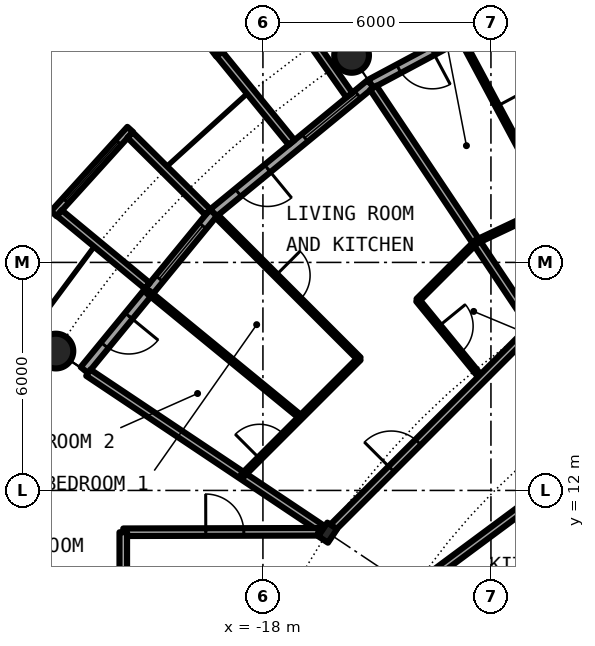
"""IFC4 building model, lengths in metres.
Left out: names, types, materials, properties, quantities, classifications, styles, units other than length and angle.
Written with IfcOpenShell. Run it as: python <this file> out.ifc"""

import sys

from ifc_helpers import new_model, si_unit, direction, frame, frame_2d, origin, origin_2d, place, context, subcontext, project, spatial, rectangle, circle, hollow_circle, i_section, extrude, element, fill, save


model = new_model("IFC4")
c1 = context("Model", 3, precision=1e-05, world=origin(), true_north=direction((0.0, 1.0)))
c2 = subcontext(c1, "Body", "Model", "MODEL_VIEW")
j1 = project(units=[si_unit("LENGTHUNIT", "METRE"), si_unit("PLANEANGLEUNIT", "RADIAN")], contexts=[c1])
p1 = place(None, origin())
s1 = spatial("IfcSite", under=j1, at=p1, CompositionType="ELEMENT")
p2 = place(p1, origin())
s2 = spatial("IfcBuilding", under=s1, at=p2, CompositionType="ELEMENT")
p3 = place(p2, frame((0.0, 0.0, 117.75)))
s3 = spatial("IfcBuildingStorey", under=s2, at=p3, CompositionType="ELEMENT", Elevation=117.75)
for number, where, z_axis, x_axis in (
    (1, (-15.667, 23.448, 0.0), (0.0, 0.0, 1.0), (1.0, 0.0, 0.0)),
    (2, (-23.448, 15.667, 0.0), (0.0, 0.0, 1.0), (1.0, 0.0, 0.0)),
):
    element("IfcColumn", number, at=place(p3, frame(where, z_axis=z_axis, x_axis=x_axis)), inside=s3, PredefinedType="COLUMN", context=c2, shape_type="SweptSolid", body=[
        extrude(hollow_circle(Radius=0.457, WallThickness=0.04, at=origin_2d()), origin(), (0.0, 0.0, 1.0), 3.05),
    ])
p4 = place(p3, frame((-16.297, 10.889, 0.0), z_axis=(0.0, 0.0, 1.0), x_axis=(-0.831469612303, 0.55557023302, 0.0)))
e3 = element("IfcColumn", 3, at=p4, inside=s3, PredefinedType="COLUMN", context=c2, shape_type="SweptSolid", body=[
    extrude(i_section(OverallWidth=0.307, OverallDepth=0.432, WebThickness=0.021, FlangeThickness=0.04, FilletRadius=0.027, at=origin_2d()), origin(), (0.0, 0.0, 1.0), 3.05),
])
p5 = place(p3, frame((-10.447, 25.222, 0.0), z_axis=(0.0, 0.0, 1.0), x_axis=(-0.881915646801, -0.471407246368, 0.0)))
e4 = element("IfcWall", 4, at=p5, inside=s3, PredefinedType="SOLIDWALL", context=c2, shape_type="SweptSolid", body=[
    extrude(rectangle(XDim=5.352, YDim=0.25, at=frame_2d((2.676, 0.0))), origin(), (0.0, 0.0, 1.0), 2.7),
])
p6 = place(p5, frame((0.441, 0.0, 0.3)))
e5 = element("IfcOpeningElement", 5, at=p6, cuts=e4, PredefinedType="OPENING", context=c2, shape_type="SweptSolid", body=[
    extrude(rectangle(XDim=1.8, YDim=2.1, at=frame_2d((0.9, 1.05))), frame((0.0, 0.135, 0.0), z_axis=(0.0, -1.0, 0.0), x_axis=(1.0, 0.0, 0.0)), (0.0, 0.0, 1.0), 0.27),
])
p7 = place(p5, frame((3.51, 0.0, 0.0)))
e6 = element("IfcOpeningElement", 6, at=p7, cuts=e4, PredefinedType="OPENING", context=c2, shape_type="SweptSolid", body=[
    extrude(rectangle(XDim=1.0, YDim=2.2, at=frame_2d((0.5, 1.1))), frame((0.0, 0.135, 0.0), z_axis=(0.0, -1.0, 0.0), x_axis=(1.0, 0.0, 0.0)), (0.0, 0.0, 1.0), 0.27),
])
p8 = place(p3, frame((-15.167, 22.699, 0.0), z_axis=(0.0, 0.0, 1.0), x_axis=(-0.773019449054, -0.634382322723, 0.0)))
e7 = element("IfcWall", 7, at=p8, inside=s3, PredefinedType="SOLIDWALL", context=c2, shape_type="SweptSolid", body=[
    extrude(rectangle(XDim=5.352, YDim=0.25, at=frame_2d((2.676, 0.0))), origin(), (0.0, 0.0, 1.0), 2.7),
])
p9 = place(p8, frame((0.441, 0.0, 0.3)))
e8 = element("IfcOpeningElement", 8, at=p9, cuts=e7, PredefinedType="OPENING", context=c2, shape_type="SweptSolid", body=[
    extrude(rectangle(XDim=1.8, YDim=2.1, at=frame_2d((0.9, 1.05))), frame((0.0, 0.135, 0.0), z_axis=(0.0, -1.0, 0.0), x_axis=(1.0, 0.0, 0.0)), (0.0, 0.0, 1.0), 0.27),
])
p10 = place(p8, frame((3.51, 0.0, 0.0)))
e9 = element("IfcOpeningElement", 9, at=p10, cuts=e7, PredefinedType="OPENING", context=c2, shape_type="SweptSolid", body=[
    extrude(rectangle(XDim=1.0, YDim=2.2, at=frame_2d((0.5, 1.1))), frame((0.0, 0.135, 0.0), z_axis=(0.0, -1.0, 0.0), x_axis=(1.0, 0.0, 0.0)), (0.0, 0.0, 1.0), 0.27),
])
p11 = place(p3, frame((-17.382, 24.94, -0.03), z_axis=(0.0, 0.0, 1.0), x_axis=(-0.797456837111, -0.603375996329, 0.0)))
e10 = element("IfcWall", 10, at=p11, inside=s3, PredefinedType="SOLIDWALL", context=c2, shape_type="SweptSolid", body=[
    extrude(rectangle(XDim=2.391, YDim=0.2, at=frame_2d((1.196, 0.0))), origin(), (0.0, 0.0, 1.0), 2.73),
])
p12 = place(p11, frame((0.156, 0.0, 0.33)))
e11 = element("IfcOpeningElement", 11, at=p12, cuts=e10, PredefinedType="OPENING", context=c2, shape_type="SweptSolid", body=[
    extrude(circle(Radius=1.04, at=frame_2d((1.04, 1.04))), frame((0.0, 0.11, 0.0), z_axis=(0.0, -1.0, 0.0), x_axis=(1.0, 0.0, 0.0)), (0.0, 0.0, 1.0), 0.22),
])
p13 = place(p3, frame((-15.726, 22.402, -0.03), z_axis=(0.0, 0.0, 1.0), x_axis=(-0.574826383135, 0.818275399393, 0.0)))
e12 = element("IfcWall", 12, at=p13, inside=s3, PredefinedType="SOLIDWALL", context=c2, shape_type="SweptSolid", body=[
    extrude(rectangle(XDim=2.929, YDim=0.2, at=frame_2d((1.465, 0.0))), origin(), (0.0, 0.0, 1.0), 2.73),
])
p14 = place(p3, frame((-17.246, 21.155, -0.03), z_axis=(0.0, 0.0, 1.0), x_axis=(-0.631741648902, 0.775179004516, 0.0)))
e13 = element("IfcWall", 13, at=p14, inside=s3, PredefinedType="SOLIDWALL", context=c2, shape_type="SweptSolid", body=[
    extrude(rectangle(XDim=3.006, YDim=0.2, at=frame_2d((1.503, 0.0))), origin(), (0.0, 0.0, 1.0), 2.73),
])
p15 = place(p3, frame((-19.304, 19.304, 0.0), z_axis=(0.0, 0.0, 1.0), x_axis=(-0.634382322723, -0.773019449054, 0.0)))
e14 = element("IfcWall", 14, at=p15, inside=s3, PredefinedType="SOLIDWALL", context=c2, shape_type="SweptSolid", body=[
    extrude(rectangle(XDim=5.352, YDim=0.25, at=frame_2d((2.676, 0.0))), origin(), (0.0, 0.0, 1.0), 2.7),
])
p16 = place(p15, frame((0.441, 0.0, 0.3)))
e15 = element("IfcOpeningElement", 15, at=p16, cuts=e14, PredefinedType="OPENING", context=c2, shape_type="SweptSolid", body=[
    extrude(rectangle(XDim=1.8, YDim=2.1, at=frame_2d((0.9, 1.05))), frame((0.0, 0.135, 0.0), z_axis=(0.0, -1.0, 0.0), x_axis=(1.0, 0.0, 0.0)), (0.0, 0.0, 1.0), 0.27),
])
p17 = place(p15, frame((3.51, 0.0, 0.0)))
e16 = element("IfcOpeningElement", 16, at=p17, cuts=e14, PredefinedType="OPENING", context=c2, shape_type="SweptSolid", body=[
    extrude(rectangle(XDim=1.0, YDim=2.2, at=frame_2d((0.5, 1.1))), frame((0.0, 0.135, 0.0), z_axis=(0.0, -1.0, 0.0), x_axis=(1.0, 0.0, 0.0)), (0.0, 0.0, 1.0), 0.27),
])
p18 = place(p3, frame((-21.493, 21.5, -0.03), z_axis=(0.0, 0.0, 1.0), x_axis=(-0.671506829416, -0.740998365753, 0.0)))
e17 = element("IfcWall", 17, at=p18, inside=s3, PredefinedType="SOLIDWALL", context=c2, shape_type="SweptSolid", body=[
    extrude(rectangle(XDim=2.993, YDim=0.2, at=frame_2d((1.497, 0.0))), origin(), (0.0, 0.0, 1.0), 2.73),
])
p19 = place(p18, frame((0.457, 0.0, 0.33)))
e18 = element("IfcOpeningElement", 18, at=p19, cuts=e17, PredefinedType="OPENING", context=c2, shape_type="SweptSolid", body=[
    extrude(circle(Radius=1.04, at=frame_2d((1.04, 1.04))), frame((0.0, 0.11, 0.0), z_axis=(0.0, -1.0, 0.0), x_axis=(1.0, 0.0, 0.0)), (0.0, 0.0, 1.0), 0.22),
])
p20 = place(p3, frame((-19.45, 19.323, -0.03), z_axis=(0.0, 0.0, 1.0), x_axis=(-0.709727076896, 0.704476739375, 0.0)))
e19 = element("IfcWall", 19, at=p20, inside=s3, PredefinedType="SOLIDWALL", context=c2, shape_type="SweptSolid", body=[
    extrude(rectangle(XDim=2.883, YDim=0.2, at=frame_2d((1.441, 0.0))), origin(), (0.0, 0.0, 1.0), 2.73),
])
p21 = place(p3, frame((-21.041, 17.384, -0.03), z_axis=(0.0, 0.0, 1.0), x_axis=(-0.770784861449, 0.63709551667, 0.0)))
e20 = element("IfcWall", 20, at=p21, inside=s3, PredefinedType="SOLIDWALL", context=c2, shape_type="SweptSolid", body=[
    extrude(rectangle(XDim=3.006, YDim=0.2, at=frame_2d((1.503, 0.0))), origin(), (0.0, 0.0, 1.0), 2.73),
])
p22 = place(p3, frame((-22.595, 15.098, 0.0), z_axis=(0.0, 0.0, 1.0), x_axis=(0.831406593008, -0.555664536482, 0.0)))
e21 = element("IfcWall", 21, at=p22, inside=s3, PredefinedType="PARTITIONING", context=c2, shape_type="SweptSolid", body=[
    extrude(rectangle(XDim=7.358, YDim=0.2, at=frame_2d((3.679, 0.0))), origin(), (0.0, 0.0, 1.0), 2.7),
])
p23 = place(p3, frame((-21.023, 17.22, 0.0), z_axis=(0.0, 0.0, 1.0), x_axis=(0.773517471898, -0.633774976367, 0.0)))
e22 = element("IfcWall", 22, at=p23, inside=s3, PredefinedType="PARTITIONING", context=c2, shape_type="SweptSolid", body=[
    extrude(rectangle(XDim=5.196, YDim=0.1, at=frame_2d((2.598, 0.0))), origin(), (0.0, 0.0, 1.0), 2.7),
])
p24 = place(p3, frame((-19.216, 19.216, 0.0), z_axis=(0.0, 0.0, 1.0), x_axis=(0.707106781187, -0.707106781187, 0.0)))
e23 = element("IfcWall", 23, at=p24, inside=s3, PredefinedType="PARTITIONING", context=c2, shape_type="SweptSolid", body=[
    extrude(rectangle(XDim=5.305, YDim=0.1, at=frame_2d((2.652, 0.0))), origin(), (0.0, 0.0, 1.0), 2.7),
])
p25 = place(p24, frame((2.202, 0.0, 0.0)))
e24 = element("IfcOpeningElement", 24, at=p25, cuts=e23, PredefinedType="OPENING", context=c2, shape_type="SweptSolid", body=[
    extrude(rectangle(XDim=0.9, YDim=2.3, at=frame_2d((0.45, 1.15))), frame((0.0, 0.06, 0.0), z_axis=(0.0, -1.0, 0.0), x_axis=(1.0, 0.0, 0.0)), (0.0, 0.0, 1.0), 0.12),
])
p26 = place(p3, frame((-15.097, 22.595, 0.0), z_axis=(0.0, 0.0, 1.0), x_axis=(0.555572791, -0.831467903109, 0.0)))
e25 = element("IfcWall", 25, at=p26, inside=s3, PredefinedType="PARTITIONING", context=c2, shape_type="SweptSolid", body=[
    extrude(rectangle(XDim=7.358, YDim=0.2, at=frame_2d((3.679, 0.0))), origin(), (0.0, 0.0, 1.0), 2.7),
])
p27 = place(p3, frame((-13.927, 17.004, 0.0), z_axis=(0.0, 0.0, 1.0), x_axis=(0.633582447834, -0.77367517848, 0.0)))
e26 = element("IfcWall", 26, at=p27, inside=s3, PredefinedType="PARTITIONING", context=c2, shape_type="SweptSolid", body=[
    extrude(rectangle(XDim=2.661, YDim=0.1, at=frame_2d((1.331, 0.0))), origin(), (0.0, 0.0, 1.0), 2.7),
])
p28 = place(p27, frame((0.881, 0.0, 0.0)))
e27 = element("IfcOpeningElement", 27, at=p28, cuts=e26, PredefinedType="OPENING", context=c2, shape_type="SweptSolid", body=[
    extrude(rectangle(XDim=0.9, YDim=2.3, at=frame_2d((0.45, 1.15))), frame((0.0, 0.06, 0.0), z_axis=(0.0, -1.0, 0.0), x_axis=(1.0, 0.0, 0.0)), (0.0, 0.0, 1.0), 0.12),
])
p29 = place(p3, frame((-12.82, 23.961, 0.0), z_axis=(0.0, 0.0, 1.0), x_axis=(0.471735511233, -0.881740101981, 0.0)))
e28 = element("IfcWall", 28, at=p29, inside=s3, PredefinedType="PARTITIONING", context=c2, shape_type="SweptSolid", body=[
    extrude(rectangle(XDim=5.09, YDim=0.1, at=frame_2d((2.545, 0.0))), origin(), (0.0, 0.0, 1.0), 2.7),
])
p30 = place(p29, frame((2.095, 0.0, 0.0)))
e29 = element("IfcOpeningElement", 29, at=p30, cuts=e28, PredefinedType="OPENING", context=c2, shape_type="SweptSolid", body=[
    extrude(rectangle(XDim=0.9, YDim=2.3, at=frame_2d((0.45, 1.15))), frame((0.0, 0.06, 0.0), z_axis=(0.0, -1.0, 0.0), x_axis=(1.0, 0.0, 0.0)), (0.0, 0.0, 1.0), 0.12),
])
p31 = place(p3, frame((-21.675, 10.9, 0.0), z_axis=(0.0, 0.0, 1.0), x_axis=(0.999997173357, 0.002377662213, 0.0)))
e30 = element("IfcWall", 30, at=p31, inside=s3, PredefinedType="PARTITIONING", context=c2, shape_type="SweptSolid", body=[
    extrude(rectangle(XDim=5.134, YDim=0.2, at=frame_2d((2.567, 0.0))), origin(), (0.0, 0.0, 1.0), 2.7),
])
p32 = place(p31, frame((2.171, 0.0, 0.0)))
e31 = element("IfcOpeningElement", 31, at=p32, cuts=e30, PredefinedType="OPENING", context=c2, shape_type="SweptSolid", body=[
    extrude(rectangle(XDim=1.0, YDim=2.3, at=frame_2d((0.5, 1.15))), frame((0.0, 0.11, 0.0), z_axis=(0.0, -1.0, 0.0), x_axis=(1.0, 0.0, 0.0)), (0.0, 0.0, 1.0), 0.22),
])
p33 = place(p3, frame((-14.052, 9.389, 0.0), z_axis=(0.0, 0.0, 1.0), x_axis=(0.803204584823, 0.59570327758, 0.0)))
e32 = element("IfcWall", 32, at=p33, inside=s3, PredefinedType="PARTITIONING", context=c2, shape_type="SweptSolid", body=[
    extrude(rectangle(XDim=11.387, YDim=0.2, at=frame_2d((5.693, 0.0))), origin(), (0.0, 0.0, 1.0), 2.7),
])
p34 = place(p33, frame((6.007, 0.0, 0.0)))
e33 = element("IfcOpeningElement", 33, at=p34, cuts=e32, PredefinedType="OPENING", context=c2, shape_type="SweptSolid", body=[
    extrude(rectangle(XDim=1.0, YDim=2.3, at=frame_2d((0.5, 1.15))), frame((0.0, 0.11, 0.0), z_axis=(0.0, -1.0, 0.0), x_axis=(1.0, 0.0, 0.0)), (0.0, 0.0, 1.0), 0.22),
])
p35 = place(p3, frame((-16.186, 11.0, 0.0), z_axis=(0.0, 0.0, 1.0), x_axis=(0.707106781187, 0.707106781187, 0.0)))
e34 = element("IfcWall", 34, at=p35, inside=s3, PredefinedType="PARTITIONING", context=c2, shape_type="SweptSolid", body=[
    extrude(rectangle(XDim=7.334, YDim=0.2, at=frame_2d((3.667, 0.0))), origin(), (0.0, 0.0, 1.0), 2.39),
])
p36 = place(p35, frame((2.211, 0.0, 0.0)))
e35 = element("IfcOpeningElement", 35, at=p36, cuts=e34, PredefinedType="OPENING", context=c2, shape_type="SweptSolid", body=[
    extrude(rectangle(XDim=1.0, YDim=2.3, at=frame_2d((0.5, 1.15))), frame((0.0, 0.11, 0.0), z_axis=(0.0, -1.0, 0.0), x_axis=(1.0, 0.0, 0.0)), (0.0, 0.0, 1.0), 0.22),
])
p37 = place(p3, frame((-21.675, 9.2, 0.0), z_axis=(0.0, 0.0, 1.0), x_axis=(0.0, 1.0, 0.0)))
e36 = element("IfcWall", 36, at=p37, inside=s3, PredefinedType="PARTITIONING", context=c2, shape_type="SweptSolid", body=[
    extrude(rectangle(XDim=1.7, YDim=0.2, at=frame_2d((0.85, 0.0))), origin(), (0.0, 0.0, 1.0), 2.7),
])
p38 = place(p3, frame((-18.542, 12.389, 0.0), z_axis=(0.0, 0.0, 1.0), x_axis=(0.707190945535, 0.707022606819, 0.0)))
e37 = element("IfcWall", 37, at=p38, inside=s3, PredefinedType="PARTITIONING", context=c2, shape_type="SweptSolid", body=[
    extrude(rectangle(XDim=4.351, YDim=0.1, at=frame_2d((2.175, 0.0))), origin(), (0.0, 0.0, 1.0), 2.7),
])
p39 = place(p38, frame((0.639, 0.0, 0.0)))
e38 = element("IfcOpeningElement", 38, at=p39, cuts=e37, PredefinedType="OPENING", context=c2, shape_type="SweptSolid", body=[
    extrude(rectangle(XDim=0.9, YDim=2.3, at=frame_2d((0.45, 1.15))), frame((0.0, 0.06, 0.0), z_axis=(0.0, -1.0, 0.0), x_axis=(1.0, 0.0, 0.0)), (0.0, 0.0, 1.0), 0.12),
])
p40 = place(p3, frame((-13.924, 17.006, 0.0), z_axis=(0.0, 0.0, 1.0), x_axis=(0.707387256653, 0.706826194425, 0.0)))
e39 = element("IfcWall", 39, at=p40, inside=s3, PredefinedType="PARTITIONING", context=c2, shape_type="SweptSolid", body=[
    extrude(rectangle(XDim=2.176, YDim=0.1, at=frame_2d((1.088, 0.0))), origin(), (0.0, 0.0, 1.0), 2.7),
])
p41 = place(p3, frame((-12.389, 18.542, 0.0), z_axis=(0.0, 0.0, 1.0), x_axis=(0.904081702397, 0.427359655782, 0.0)))
e40 = element("IfcWall", 40, at=p41, inside=s3, PredefinedType="PARTITIONING", context=c2, shape_type="SweptSolid", body=[
    extrude(rectangle(XDim=2.181, YDim=0.1, at=frame_2d((1.091, 0.0))), origin(), (0.0, 0.0, 1.0), 2.7),
])
p42 = place(p7, origin())
e41 = element("IfcDoor", 41, at=p42, inside=s3, OperationType="SINGLE_SWING_LEFT", PredefinedType="DOOR", context=c2, shape_type="SweptSolid", body=[
    extrude(rectangle(XDim=1.0, YDim=2.2, at=frame_2d((0.5, 1.1))), frame((0.0, 0.025, 0.0), z_axis=(0.0, -1.0, 0.0), x_axis=(1.0, 0.0, 0.0)), (0.0, 0.0, 1.0), 0.05),
])
fill(e6, e41)
p43 = place(p9, origin())
e42 = element("IfcWindow", 42, at=p43, inside=s3, PartitioningType="SINGLE_PANEL", PredefinedType="WINDOW", context=c2, shape_type="SweptSolid", body=[
    extrude(rectangle(XDim=1.8, YDim=2.1, at=frame_2d((0.9, 1.05))), frame((0.0, 0.03, 0.0), z_axis=(0.0, -1.0, 0.0), x_axis=(1.0, 0.0, 0.0)), (0.0, 0.0, 1.0), 0.06),
])
fill(e8, e42)
p44 = place(p10, origin())
e43 = element("IfcDoor", 43, at=p44, inside=s3, OperationType="SINGLE_SWING_LEFT", PredefinedType="DOOR", context=c2, shape_type="SweptSolid", body=[
    extrude(rectangle(XDim=1.0, YDim=2.2, at=frame_2d((0.5, 1.1))), frame((0.0, 0.025, 0.0), z_axis=(0.0, -1.0, 0.0), x_axis=(1.0, 0.0, 0.0)), (0.0, 0.0, 1.0), 0.05),
])
fill(e9, e43)
p45 = place(p16, origin())
e44 = element("IfcWindow", 44, at=p45, inside=s3, PartitioningType="SINGLE_PANEL", PredefinedType="WINDOW", context=c2, shape_type="SweptSolid", body=[
    extrude(rectangle(XDim=1.8, YDim=2.1, at=frame_2d((0.9, 1.05))), frame((0.0, 0.03, 0.0), z_axis=(0.0, -1.0, 0.0), x_axis=(1.0, 0.0, 0.0)), (0.0, 0.0, 1.0), 0.06),
])
fill(e15, e44)
p46 = place(p19, origin())
e45 = element("IfcWindow", 45, at=p46, inside=s3, PartitioningType="SINGLE_PANEL", PredefinedType="WINDOW", context=c2, shape_type="SweptSolid", body=[
    extrude(circle(Radius=1.04, at=frame_2d((1.04, 1.04))), frame((0.0, 0.03, 0.0), z_axis=(0.0, -1.0, 0.0), x_axis=(1.0, 0.0, 0.0)), (0.0, 0.0, 1.0), 0.06),
])
fill(e18, e45)
p47 = place(p17, origin())
e46 = element("IfcDoor", 46, at=p47, inside=s3, OperationType="SINGLE_SWING_LEFT", PredefinedType="DOOR", context=c2, shape_type="SweptSolid", body=[
    extrude(rectangle(XDim=1.0, YDim=2.2, at=frame_2d((0.5, 1.1))), frame((0.0, 0.025, 0.0), z_axis=(0.0, -1.0, 0.0), x_axis=(1.0, 0.0, 0.0)), (0.0, 0.0, 1.0), 0.05),
])
fill(e16, e46)
p48 = place(p30, origin())
e47 = element("IfcDoor", 47, at=p48, inside=s3, OperationType="SINGLE_SWING_RIGHT", PredefinedType="DOOR", context=c2, shape_type="SweptSolid", body=[
    extrude(rectangle(XDim=0.9, YDim=2.3, at=frame_2d((0.45, 1.15))), frame((0.0, 0.025, 0.0), z_axis=(0.0, -1.0, 0.0), x_axis=(1.0, 0.0, 0.0)), (0.0, 0.0, 1.0), 0.05),
])
fill(e29, e47)
p49 = place(p36, origin())
e48 = element("IfcDoor", 48, at=p49, inside=s3, OperationType="SINGLE_SWING_LEFT", PredefinedType="DOOR", context=c2, shape_type="SweptSolid", body=[
    extrude(rectangle(XDim=1.0, YDim=2.3, at=frame_2d((0.5, 1.15))), frame((0.0, 0.025, 0.0), z_axis=(0.0, -1.0, 0.0), x_axis=(1.0, 0.0, 0.0)), (0.0, 0.0, 1.0), 0.05),
])
fill(e35, e48)
p50 = place(p28, origin())
e49 = element("IfcDoor", 49, at=p50, inside=s3, OperationType="SINGLE_SWING_RIGHT", PredefinedType="DOOR", context=c2, shape_type="SweptSolid", body=[
    extrude(rectangle(XDim=0.9, YDim=2.3, at=frame_2d((0.45, 1.15))), frame((0.0, 0.025, 0.0), z_axis=(0.0, -1.0, 0.0), x_axis=(1.0, 0.0, 0.0)), (0.0, 0.0, 1.0), 0.05),
])
fill(e27, e49)
p51 = place(p25, origin())
e50 = element("IfcDoor", 50, at=p51, inside=s3, OperationType="SINGLE_SWING_LEFT", PredefinedType="DOOR", context=c2, shape_type="SweptSolid", body=[
    extrude(rectangle(XDim=0.9, YDim=2.3, at=frame_2d((0.45, 1.15))), frame((0.0, 0.025, 0.0), z_axis=(0.0, -1.0, 0.0), x_axis=(1.0, 0.0, 0.0)), (0.0, 0.0, 1.0), 0.05),
])
fill(e24, e50)
p52 = place(p39, origin())
e51 = element("IfcDoor", 51, at=p52, inside=s3, OperationType="SINGLE_SWING_LEFT", PredefinedType="DOOR", context=c2, shape_type="SweptSolid", body=[
    extrude(rectangle(XDim=0.9, YDim=2.3, at=frame_2d((0.45, 1.15))), frame((0.0, 0.025, 0.0), z_axis=(0.0, -1.0, 0.0), x_axis=(1.0, 0.0, 0.0)), (0.0, 0.0, 1.0), 0.05),
])
fill(e38, e51)
p53 = place(p32, origin())
e52 = element("IfcDoor", 52, at=p53, inside=s3, OperationType="SINGLE_SWING_RIGHT", PredefinedType="DOOR", context=c2, shape_type="SweptSolid", body=[
    extrude(rectangle(XDim=1.0, YDim=2.3, at=frame_2d((0.5, 1.15))), frame((0.0, 0.025, 0.0), z_axis=(0.0, -1.0, 0.0), x_axis=(1.0, 0.0, 0.0)), (0.0, 0.0, 1.0), 0.05),
])
fill(e31, e52)
save(model, sys.argv[1])
